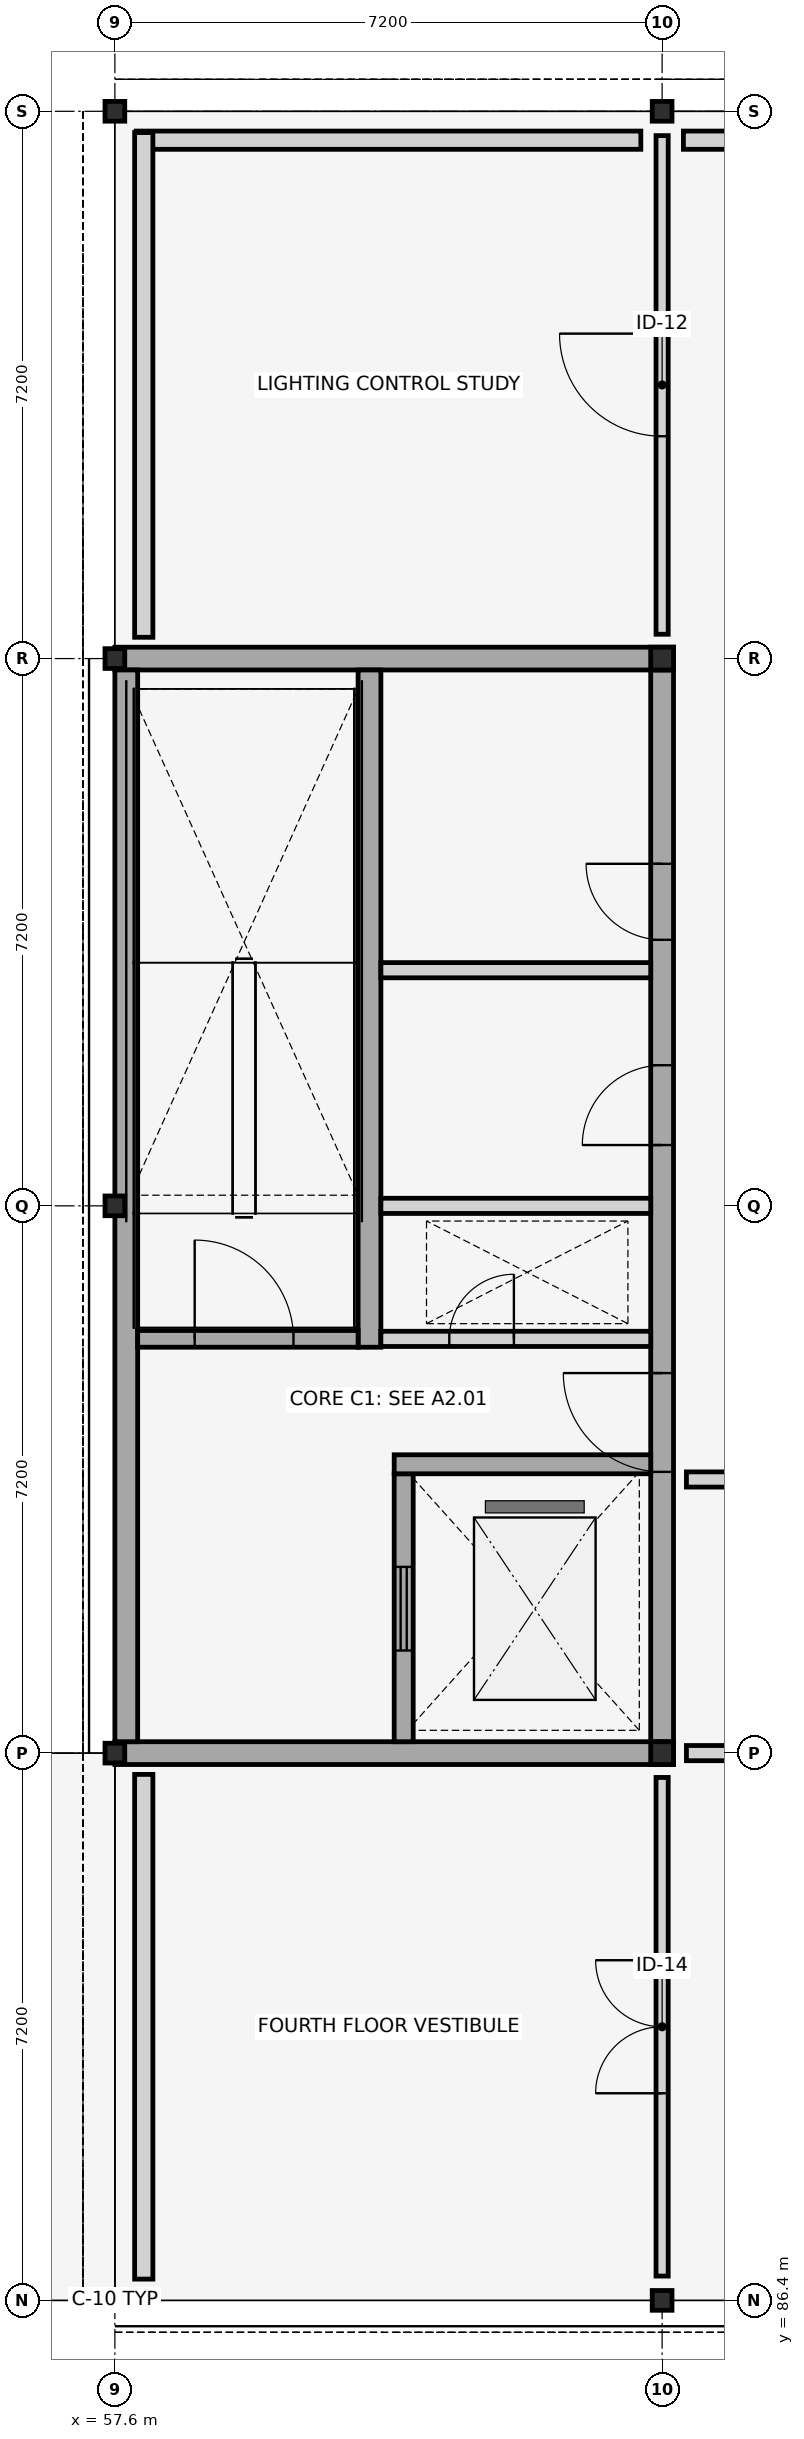
"""IFC4 building model, lengths in metres.
Left out: names, types, materials, properties, quantities, classifications, styles, units other than length and angle.
Written with IfcOpenShell. Run it as: python <this file> out.ifc"""

import sys

from ifc_helpers import new_model, si_unit, direction, frame, frame_2d, origin, origin_2d, place, context, subcontext, project, spatial, rectangle, i_section, extrude, element, fill, save


model = new_model("IFC4")
c1 = context("Model", 3, precision=1e-05, world=origin(), true_north=direction((0.0, 1.0)))
c2 = subcontext(c1, "Body", "Model", "MODEL_VIEW")
j1 = project(units=[si_unit("LENGTHUNIT", "METRE"), si_unit("PLANEANGLEUNIT", "RADIAN")], contexts=[c1])
p1 = place(None, origin())
s1 = spatial("IfcSite", under=j1, at=p1, CompositionType="ELEMENT")
p2 = place(p1, origin())
s2 = spatial("IfcBuilding", under=s1, at=p2, CompositionType="ELEMENT")
p3 = place(p2, frame((0.0, 0.0, 17.1)))
s3 = spatial("IfcBuildingStorey", under=s2, at=p3, CompositionType="ELEMENT", Elevation=17.1)
for number, where, z_axis, x_axis in (
    (1, (57.6, 86.4, 0.0), (0.0, 0.0, 1.0), (1.0, 0.0, 0.0)),
    (2, (57.6, 93.6, 0.0), (0.0, 0.0, 1.0), (0.0, 1.0, 0.0)),
    (3, (57.6, 100.8, 0.0), (0.0, 0.0, 1.0), (1.0, 0.0, 0.0)),
    (4, (57.6, 108.0, 0.0), (0.0, 0.0, 1.0), (0.0, 1.0, 0.0)),
    (5, (57.6, 115.2, 0.0), (0.0, 0.0, 1.0), (1.0, 0.0, 0.0)),
    (6, (64.8, 86.4, 0.0), (0.0, 0.0, 1.0), (0.0, 1.0, 0.0)),
):
    element("IfcColumn", number, at=place(p3, frame(where, z_axis=z_axis, x_axis=x_axis)), inside=s3, PredefinedType="COLUMN", context=c2, shape_type="SweptSolid", body=[
        extrude(i_section(OverallWidth=0.26, OverallDepth=0.26, WebThickness=0.01, FlangeThickness=0.018, FilletRadius=0.024, at=origin_2d()), origin(), (0.0, 0.0, 1.0), 8.1),
    ])
for number, where, z_axis, x_axis in (
    (7, (64.8, 93.6, 0.0), (0.0, 0.0, 1.0), (1.0, 0.0, 0.0)),
    (8, (64.8, 108.0, 0.0), (0.0, 0.0, 1.0), (1.0, 0.0, 0.0)),
):
    element("IfcColumn", number, at=place(p3, frame(where, z_axis=z_axis, x_axis=x_axis)), inside=s3, PredefinedType="COLUMN", context=c2, shape_type="SweptSolid", body=[
        extrude(i_section(OverallWidth=0.3, OverallDepth=0.3, WebThickness=0.011, FlangeThickness=0.019, FilletRadius=0.027, at=origin_2d()), origin(), (0.0, 0.0, 1.0), 8.1),
    ])
p4 = place(p3, frame((64.8, 115.2, 0.0), z_axis=(0.0, 0.0, 1.0), x_axis=(0.0, 1.0, 0.0)))
e9 = element("IfcColumn", 9, at=p4, inside=s3, PredefinedType="COLUMN", context=c2, shape_type="SweptSolid", body=[
    extrude(i_section(OverallWidth=0.26, OverallDepth=0.26, WebThickness=0.01, FlangeThickness=0.018, FilletRadius=0.024, at=origin_2d()), origin(), (0.0, 0.0, 1.0), 8.1),
])
p5 = place(p3, frame((71.72, 114.82, 0.0), z_axis=(0.0, 0.0, 1.0), x_axis=(-1.0, 0.0, 0.0)))
e10 = element("IfcWall", 10, at=p5, inside=s3, PredefinedType="STANDARD", context=c2, shape_type="SweptSolid", body=[
    extrude(rectangle(XDim=6.64, YDim=0.24, at=frame_2d((3.32, 0.0))), origin(), (0.0, 0.0, 1.0), 7.48),
])
p6 = place(p3, frame((64.52, 114.82, 0.0), z_axis=(0.0, 0.0, 1.0), x_axis=(-1.0, 0.0, 0.0)))
e11 = element("IfcWall", 11, at=p6, inside=s3, PredefinedType="STANDARD", context=c2, shape_type="SweptSolid", body=[
    extrude(rectangle(XDim=6.64, YDim=0.24, at=frame_2d((3.32, 0.0))), origin(), (0.0, 0.0, 1.0), 7.48),
])
p7 = place(p3, frame((57.98, 114.92, 0.0), z_axis=(0.0, 0.0, 1.0), x_axis=(0.0, -1.0, 0.0)))
e12 = element("IfcWall", 12, at=p7, inside=s3, PredefinedType="STANDARD", context=c2, shape_type="SweptSolid", body=[
    extrude(rectangle(XDim=6.64, YDim=0.24, at=frame_2d((3.32, 0.0))), origin(), (0.0, 0.0, 1.0), 7.48),
])
p8 = place(p3, frame((57.98, 93.32, 0.0), z_axis=(0.0, 0.0, 1.0), x_axis=(0.0, -1.0, 0.0)))
e13 = element("IfcWall", 13, at=p8, inside=s3, PredefinedType="STANDARD", context=c2, shape_type="SweptSolid", body=[
    extrude(rectangle(XDim=6.64, YDim=0.24, at=frame_2d((3.32, 0.0))), origin(), (0.0, 0.0, 1.0), 7.48),
])
for number, where, z_axis, x_axis in (
    (14, (57.6, 93.6, 0.0), (0.0, 0.0, 1.0), (1.0, 0.0, 0.0)),
    (15, (57.6, 108.0, 0.0), (0.0, 0.0, 1.0), (1.0, 0.0, 0.0)),
):
    element("IfcWall", number, at=place(p3, frame(where, z_axis=z_axis, x_axis=x_axis)), inside=s3, PredefinedType="SHEAR", context=c2, shape_type="SweptSolid", body=[
        extrude(rectangle(XDim=7.35, YDim=0.3, at=frame_2d((3.675, 0.0))), origin(), (0.0, 0.0, 1.0), 7.88),
    ])
p9 = place(p3, frame((57.75, 93.75, 0.0), z_axis=(0.0, 0.0, 1.0), x_axis=(0.0, 1.0, 0.0)))
e16 = element("IfcWall", 16, at=p9, inside=s3, PredefinedType="SHEAR", context=c2, shape_type="SweptSolid", body=[
    extrude(rectangle(XDim=14.1, YDim=0.3, at=frame_2d((7.05, 0.0))), origin(), (0.0, 0.0, 1.0), 7.88),
])
p10 = place(p3, frame((64.8, 93.75, 0.0), z_axis=(0.0, 0.0, 1.0), x_axis=(0.0, 1.0, 0.0)))
e17 = element("IfcWall", 17, at=p10, inside=s3, PredefinedType="SHEAR", context=c2, shape_type="SweptSolid", body=[
    extrude(rectangle(XDim=14.1, YDim=0.3, at=frame_2d((7.05, 0.0))), origin(), (0.0, 0.0, 1.0), 7.88),
])
p11 = place(p10, frame((3.55, 0.0, 0.0)))
e18 = element("IfcOpeningElement", 18, at=p11, cuts=e17, PredefinedType="OPENING", context=c2, shape_type="SweptSolid", body=[
    extrude(rectangle(XDim=1.3, YDim=2.2, at=frame_2d((0.65, 1.1))), frame((0.0, 0.16, 0.0), z_axis=(0.0, -1.0, 0.0), x_axis=(1.0, 0.0, 0.0)), (0.0, 0.0, 1.0), 0.32),
])
p12 = place(p10, frame((7.85, 0.0, 0.0)))
e19 = element("IfcOpeningElement", 19, at=p12, cuts=e17, PredefinedType="OPENING", context=c2, shape_type="SweptSolid", body=[
    extrude(rectangle(XDim=1.05, YDim=2.15, at=frame_2d((0.525, 1.075))), frame((0.0, 0.16, 0.0), z_axis=(0.0, -1.0, 0.0), x_axis=(1.0, 0.0, 0.0)), (0.0, 0.0, 1.0), 0.32),
])
p13 = place(p10, frame((10.55, 0.0, 0.0)))
e20 = element("IfcOpeningElement", 20, at=p13, cuts=e17, PredefinedType="OPENING", context=c2, shape_type="SweptSolid", body=[
    extrude(rectangle(XDim=1.0, YDim=2.15, at=frame_2d((0.5, 1.075))), frame((0.0, 0.16, 0.0), z_axis=(0.0, -1.0, 0.0), x_axis=(1.0, 0.0, 0.0)), (0.0, 0.0, 1.0), 0.32),
])
p14 = place(p3, frame((61.4, 93.75, 0.0), z_axis=(0.0, 0.0, 1.0), x_axis=(0.0, 1.0, 0.0)))
e21 = element("IfcWall", 21, at=p14, inside=s3, PredefinedType="SHEAR", context=c2, shape_type="SweptSolid", body=[
    extrude(rectangle(XDim=3.525, YDim=0.25, at=frame_2d((1.762, 0.0))), origin(), (0.0, 0.0, 1.0), 7.88),
])
p15 = place(p14, frame((1.2, 0.0, 0.0)))
e22 = element("IfcOpeningElement", 22, at=p15, cuts=e21, PredefinedType="OPENING", context=c2, shape_type="SweptSolid", body=[
    extrude(rectangle(XDim=1.1, YDim=2.15, at=frame_2d((0.55, 1.075))), frame((0.0, 0.135, 0.0), z_axis=(0.0, -1.0, 0.0), x_axis=(1.0, 0.0, 0.0)), (0.0, 0.0, 1.0), 0.27),
])
p16 = place(p3, frame((60.95, 98.94, 0.0), z_axis=(0.0, 0.0, 1.0), x_axis=(0.0, 1.0, 0.0)))
e23 = element("IfcWall", 23, at=p16, inside=s3, PredefinedType="SHEAR", context=c2, shape_type="SweptSolid", body=[
    extrude(rectangle(XDim=8.91, YDim=0.3, at=frame_2d((4.455, 0.0))), origin(), (0.0, 0.0, 1.0), 7.88),
])
p17 = place(p3, frame((61.1, 99.05, 0.0), z_axis=(0.0, 0.0, 1.0), x_axis=(1.0, 0.0, 0.0)))
e24 = element("IfcWall", 24, at=p17, inside=s3, PredefinedType="PLUMBINGWALL", context=c2, shape_type="SweptSolid", body=[
    extrude(rectangle(XDim=3.55, YDim=0.2, at=frame_2d((1.775, 0.0))), origin(), (0.0, 0.0, 1.0), 7.3),
])
p18 = place(p17, frame((0.9, 0.0, 0.0)))
e25 = element("IfcOpeningElement", 25, at=p18, cuts=e24, PredefinedType="OPENING", context=c2, shape_type="SweptSolid", body=[
    extrude(rectangle(XDim=0.85, YDim=2.05, at=frame_2d((0.425, 1.025))), frame((0.0, 0.11, 0.0), z_axis=(0.0, -1.0, 0.0), x_axis=(1.0, 0.0, 0.0)), (0.0, 0.0, 1.0), 0.22),
])
p19 = place(p3, frame((57.9, 99.05, 0.0), z_axis=(0.0, 0.0, 1.0), x_axis=(1.0, 0.0, 0.0)))
e26 = element("IfcWall", 26, at=p19, inside=s3, PredefinedType="SHEAR", context=c2, shape_type="SweptSolid", body=[
    extrude(rectangle(XDim=2.9, YDim=0.22, at=frame_2d((1.45, 0.0))), origin(), (0.0, 0.0, 1.0), 7.88),
])
p20 = place(p19, frame((0.75, 0.0, 0.0)))
e27 = element("IfcOpeningElement", 27, at=p20, cuts=e26, PredefinedType="OPENING", context=c2, shape_type="SweptSolid", body=[
    extrude(rectangle(XDim=1.3, YDim=2.2, at=frame_2d((0.65, 1.1))), frame((0.0, 0.12, 0.0), z_axis=(0.0, -1.0, 0.0), x_axis=(1.0, 0.0, 0.0)), (0.0, 0.0, 1.0), 0.24),
])
p21 = place(p3, frame((61.275, 97.4, 0.0), z_axis=(0.0, 0.0, 1.0), x_axis=(1.0, 0.0, 0.0)))
e28 = element("IfcWall", 28, at=p21, inside=s3, PredefinedType="SHEAR", context=c2, shape_type="SweptSolid", body=[
    extrude(rectangle(XDim=3.375, YDim=0.25, at=frame_2d((1.688, 0.0))), origin(), (0.0, 0.0, 1.0), 7.88),
])
for number, where, z_axis, x_axis in (
    (29, (61.1, 100.8, 0.0), (0.0, 0.0, 1.0), (1.0, 0.0, 0.0)),
    (30, (61.1, 103.9, 0.0), (0.0, 0.0, 1.0), (1.0, 0.0, 0.0)),
):
    element("IfcWall", number, at=place(p3, frame(where, z_axis=z_axis, x_axis=x_axis)), inside=s3, PredefinedType="PLUMBINGWALL", context=c2, shape_type="SweptSolid", body=[
        extrude(rectangle(XDim=3.55, YDim=0.2, at=frame_2d((1.775, 0.0))), origin(), (0.0, 0.0, 1.0), 7.3),
    ])
p22 = place(p3, frame((65.12, 97.2, 0.0), z_axis=(0.0, 0.0, 1.0), x_axis=(1.0, 0.0, 0.0)))
e31 = element("IfcWall", 31, at=p22, inside=s3, PredefinedType="PARTITIONING", context=c2, shape_type="SweptSolid", body=[
    extrude(rectangle(XDim=28.16, YDim=0.2, at=frame_2d((14.08, 0.0))), origin(), (0.0, 0.0, 1.0), 7.05),
])
p23 = place(p22, frame((1.649, 0.0, 0.0)))
e32 = element("IfcOpeningElement", 32, at=p23, cuts=e31, PredefinedType="OPENING", context=c2, shape_type="SweptSolid", body=[
    extrude(rectangle(XDim=1.6, YDim=2.35, at=frame_2d((0.8, 1.175))), frame((0.0, 0.11, 0.0), z_axis=(0.0, -1.0, 0.0), x_axis=(1.0, 0.0, 0.0)), (0.0, 0.0, 1.0), 0.22),
])
p24 = place(p3, frame((65.12, 93.6, 0.0), z_axis=(0.0, 0.0, 1.0), x_axis=(1.0, 0.0, 0.0)))
e33 = element("IfcWall", 33, at=p24, inside=s3, PredefinedType="PARTITIONING", context=c2, shape_type="SweptSolid", body=[
    extrude(rectangle(XDim=28.16, YDim=0.2, at=frame_2d((14.08, 0.0))), origin(), (0.0, 0.0, 1.0), 7.05),
])
p25 = place(p24, frame((1.649, 0.0, 0.0)))
e34 = element("IfcOpeningElement", 34, at=p25, cuts=e33, PredefinedType="OPENING", context=c2, shape_type="SweptSolid", body=[
    extrude(rectangle(XDim=1.6, YDim=2.35, at=frame_2d((0.8, 1.175))), frame((0.0, 0.11, 0.0), z_axis=(0.0, -1.0, 0.0), x_axis=(1.0, 0.0, 0.0)), (0.0, 0.0, 1.0), 0.22),
])
p26 = place(p3, frame((64.8, 108.32, 0.0), z_axis=(0.0, 0.0, 1.0), x_axis=(0.0, 1.0, 0.0)))
e35 = element("IfcWall", 35, at=p26, inside=s3, PredefinedType="PARTITIONING", context=c2, shape_type="SweptSolid", body=[
    extrude(rectangle(XDim=6.56, YDim=0.16, at=frame_2d((3.28, 0.0))), origin(), (0.0, 0.0, 1.0), 7.05),
])
p27 = place(p26, frame((2.605, 0.0, 0.0)))
e36 = element("IfcOpeningElement", 36, at=p27, cuts=e35, PredefinedType="OPENING", context=c2, shape_type="SweptSolid", body=[
    extrude(rectangle(XDim=1.35, YDim=2.35, at=frame_2d((0.675, 1.175))), frame((0.0, 0.09, 0.0), z_axis=(0.0, -1.0, 0.0), x_axis=(1.0, 0.0, 0.0)), (0.0, 0.0, 1.0), 0.18),
])
p28 = place(p3, frame((64.8, 86.72, 0.0), z_axis=(0.0, 0.0, 1.0), x_axis=(0.0, 1.0, 0.0)))
e37 = element("IfcWall", 37, at=p28, inside=s3, PredefinedType="PARTITIONING", context=c2, shape_type="SweptSolid", body=[
    extrude(rectangle(XDim=6.56, YDim=0.16, at=frame_2d((3.28, 0.0))), origin(), (0.0, 0.0, 1.0), 7.05),
])
p29 = place(p28, frame((2.405, 0.0, 0.0)))
e38 = element("IfcOpeningElement", 38, at=p29, cuts=e37, PredefinedType="OPENING", context=c2, shape_type="SweptSolid", body=[
    extrude(rectangle(XDim=1.75, YDim=2.45, at=frame_2d((0.875, 1.225))), frame((0.0, 0.09, 0.0), z_axis=(0.0, -1.0, 0.0), x_axis=(1.0, 0.0, 0.0)), (0.0, 0.0, 1.0), 0.18),
])
p30 = place(p11, origin())
e39 = element("IfcDoor", 39, at=p30, inside=s3, OperationType="SINGLE_SWING_RIGHT", PredefinedType="DOOR", context=c2, shape_type="SweptSolid", body=[
    extrude(rectangle(XDim=1.3, YDim=2.2, at=frame_2d((0.65, 1.1))), frame((0.0, 0.025, 0.0), z_axis=(0.0, -1.0, 0.0), x_axis=(1.0, 0.0, 0.0)), (0.0, 0.0, 1.0), 0.05),
])
fill(e18, e39)
p31 = place(p12, origin())
e40 = element("IfcDoor", 40, at=p31, inside=s3, OperationType="SINGLE_SWING_LEFT", PredefinedType="DOOR", context=c2, shape_type="SweptSolid", body=[
    extrude(rectangle(XDim=1.05, YDim=2.15, at=frame_2d((0.525, 1.075))), frame((0.0, 0.025, 0.0), z_axis=(0.0, -1.0, 0.0), x_axis=(1.0, 0.0, 0.0)), (0.0, 0.0, 1.0), 0.05),
])
fill(e19, e40)
p32 = place(p13, origin())
e41 = element("IfcDoor", 41, at=p32, inside=s3, OperationType="SINGLE_SWING_RIGHT", PredefinedType="DOOR", context=c2, shape_type="SweptSolid", body=[
    extrude(rectangle(XDim=1.0, YDim=2.15, at=frame_2d((0.5, 1.075))), frame((0.0, 0.025, 0.0), z_axis=(0.0, -1.0, 0.0), x_axis=(1.0, 0.0, 0.0)), (0.0, 0.0, 1.0), 0.05),
])
fill(e20, e41)
p33 = place(p15, origin())
e42 = element("IfcDoor", 42, at=p33, inside=s3, OperationType="SLIDING_TO_LEFT", PredefinedType="DOOR", context=c2, shape_type="SweptSolid", body=[
    extrude(rectangle(XDim=1.1, YDim=2.15, at=frame_2d((0.55, 1.075))), frame((0.0, 0.025, 0.0), z_axis=(0.0, -1.0, 0.0), x_axis=(1.0, 0.0, 0.0)), (0.0, 0.0, 1.0), 0.05),
])
fill(e22, e42)
p34 = place(p18, origin())
e43 = element("IfcDoor", 43, at=p34, inside=s3, OperationType="SINGLE_SWING_RIGHT", PredefinedType="TRAPDOOR", context=c2, shape_type="SweptSolid", body=[
    extrude(rectangle(XDim=0.85, YDim=2.05, at=frame_2d((0.425, 1.025))), frame((0.0, 0.025, 0.0), z_axis=(0.0, -1.0, 0.0), x_axis=(1.0, 0.0, 0.0)), (0.0, 0.0, 1.0), 0.05),
])
fill(e25, e43)
p35 = place(p20, origin())
e44 = element("IfcDoor", 44, at=p35, inside=s3, OperationType="SINGLE_SWING_LEFT", PredefinedType="DOOR", context=c2, shape_type="SweptSolid", body=[
    extrude(rectangle(XDim=1.3, YDim=2.2, at=frame_2d((0.65, 1.1))), frame((0.0, 0.025, 0.0), z_axis=(0.0, -1.0, 0.0), x_axis=(1.0, 0.0, 0.0)), (0.0, 0.0, 1.0), 0.05),
])
fill(e27, e44)
p36 = place(p27, origin())
e45 = element("IfcDoor", 45, at=p36, inside=s3, OperationType="SINGLE_SWING_RIGHT", PredefinedType="DOOR", context=c2, shape_type="SweptSolid", body=[
    extrude(rectangle(XDim=1.35, YDim=2.35, at=frame_2d((0.675, 1.175))), frame((0.0, 0.025, 0.0), z_axis=(0.0, -1.0, 0.0), x_axis=(1.0, 0.0, 0.0)), (0.0, 0.0, 1.0), 0.05),
])
fill(e36, e45)
p37 = place(p29, origin())
e46 = element("IfcDoor", 46, at=p37, inside=s3, OperationType="DOUBLE_DOOR_SINGLE_SWING", PredefinedType="DOOR", context=c2, shape_type="SweptSolid", body=[
    extrude(rectangle(XDim=1.75, YDim=2.45, at=frame_2d((0.875, 1.225))), frame((0.0, 0.025, 0.0), z_axis=(0.0, -1.0, 0.0), x_axis=(1.0, 0.0, 0.0)), (0.0, 0.0, 1.0), 0.05),
])
fill(e38, e46)
save(model, sys.argv[1])
